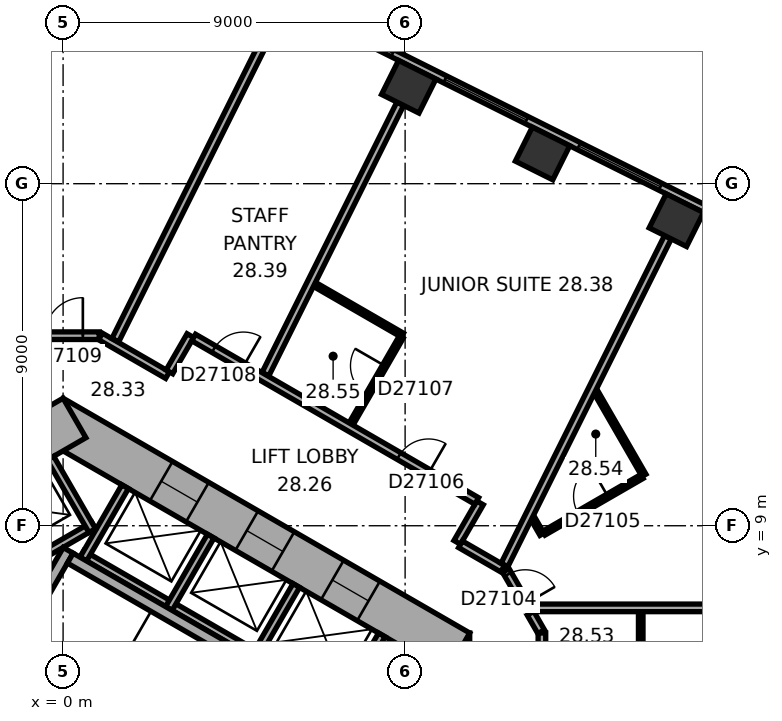
"""IFC4 building model, lengths in metres.
Left out: names, types, materials, properties, quantities, classifications, styles, units other than length and angle.
Written with IfcOpenShell. Run it as: python <this file> out.ifc"""

import sys

from ifc_helpers import new_model, si_unit, direction, frame, frame_2d, origin, origin_2d, place, context, subcontext, project, spatial, rectangle, extrude, element, fill, save


model = new_model("IFC4")
c1 = context("Model", 3, precision=1e-05, world=origin(), true_north=direction((0.0, 1.0)))
c2 = subcontext(c1, "Body", "Model", "MODEL_VIEW")
j1 = project(units=[si_unit("LENGTHUNIT", "METRE"), si_unit("PLANEANGLEUNIT", "RADIAN")], contexts=[c1])
p1 = place(None, origin())
s1 = spatial("IfcSite", under=j1, at=p1, CompositionType="ELEMENT")
p2 = place(p1, origin())
s2 = spatial("IfcBuilding", under=s1, at=p2, CompositionType="ELEMENT")
p3 = place(p2, frame((0.0, 0.0, 116.6)))
s3 = spatial("IfcBuildingStorey", under=s2, at=p3, CompositionType="ELEMENT", Elevation=116.6)
for number, where, z_axis, x_axis in (
    (1, (16.138, 17.04, 0.0), (0.0, 0.0, 1.0), (-0.895, 0.446, 0.0)),
    (2, (12.616, 18.795, 0.0), (0.0, 0.0, 1.0), (-0.895, 0.446, 0.0)),
    (3, (9.095, 20.551, 0.0), (0.0, 0.0, 1.0), (-0.895, 0.446, 0.0)),
):
    element("IfcColumn", number, at=place(p3, frame(where, z_axis=z_axis, x_axis=x_axis)), inside=s3, PredefinedType="COLUMN", context=c2, shape_type="SweptSolid", body=[
        extrude(rectangle(XDim=1.1, YDim=1.0, at=origin_2d()), origin(), (0.0, 0.0, 1.0), 3.3),
    ])
p4 = place(p3, frame((10.1, -6.177, 0.0), z_axis=(0.0, 0.0, 1.0), x_axis=(0.0, 1.0, 0.0)))
e4 = element("IfcWall", 4, at=p4, inside=s3, PredefinedType="SHEAR", context=c2, shape_type="SweptSolid", body=[
    extrude(rectangle(XDim=12.355, YDim=1.2, at=frame_2d((6.177, 0.0))), origin(), (0.0, 0.0, 1.0), 3.3),
])
p5 = place(p4, frame((6.378, 0.0, 0.0)))
e5 = element("IfcOpeningElement", 5, at=p5, cuts=e4, PredefinedType="OPENING", context=c2, shape_type="SweptSolid", body=[
    extrude(rectangle(XDim=1.5, YDim=2.1, at=frame_2d((0.75, 1.05))), frame((0.0, 0.61, 0.0), z_axis=(0.0, -1.0, 0.0), x_axis=(1.0, 0.0, 0.0)), (0.0, 0.0, 1.0), 1.22),
])
p6 = place(p4, frame((1.828, 0.0, 0.0)))
e6 = element("IfcOpeningElement", 6, at=p6, cuts=e4, PredefinedType="OPENING", context=c2, shape_type="SweptSolid", body=[
    extrude(rectangle(XDim=1.1, YDim=2.1, at=frame_2d((0.55, 1.05))), frame((0.0, 0.61, 0.0), z_axis=(0.0, -1.0, 0.0), x_axis=(1.0, 0.0, 0.0)), (0.0, 0.0, 1.0), 1.22),
])
p7 = place(p4, frame((4.427, 0.0, 0.0)))
e7 = element("IfcOpeningElement", 7, at=p7, cuts=e4, PredefinedType="OPENING", context=c2, shape_type="SweptSolid", body=[
    extrude(rectangle(XDim=1.1, YDim=2.1, at=frame_2d((0.55, 1.05))), frame((0.0, 0.61, 0.0), z_axis=(0.0, -1.0, 0.0), x_axis=(1.0, 0.0, 0.0)), (0.0, 0.0, 1.0), 1.22),
])
p8 = place(p3, frame((10.4, 5.658, 0.0), z_axis=(0.0, 0.0, 1.0), x_axis=(-0.866021384402, 0.500006961711, 0.0)))
e8 = element("IfcWall", 8, at=p8, inside=s3, PredefinedType="SHEAR", context=c2, shape_type="SweptSolid", body=[
    extrude(rectangle(XDim=12.355, YDim=1.2, at=frame_2d((6.178, 0.0))), origin(), (0.0, 0.0, 1.0), 3.3),
])
p9 = place(p8, frame((2.728, 0.0, 0.0)))
e9 = element("IfcOpeningElement", 9, at=p9, cuts=e8, PredefinedType="OPENING", context=c2, shape_type="SweptSolid", body=[
    extrude(rectangle(XDim=1.1, YDim=2.1, at=frame_2d((0.55, 1.05))), frame((0.0, 0.61, 0.0), z_axis=(0.0, -1.0, 0.0), x_axis=(1.0, 0.0, 0.0)), (0.0, 0.0, 1.0), 1.22),
])
p10 = place(p8, frame((5.328, 0.0, 0.0)))
e10 = element("IfcOpeningElement", 10, at=p10, cuts=e8, PredefinedType="OPENING", context=c2, shape_type="SweptSolid", body=[
    extrude(rectangle(XDim=1.1, YDim=2.1, at=frame_2d((0.55, 1.05))), frame((0.0, 0.61, 0.0), z_axis=(0.0, -1.0, 0.0), x_axis=(1.0, 0.0, 0.0)), (0.0, 0.0, 1.0), 1.22),
])
p11 = place(p8, frame((7.928, 0.0, 0.0)))
e11 = element("IfcOpeningElement", 11, at=p11, cuts=e8, PredefinedType="OPENING", context=c2, shape_type="SweptSolid", body=[
    extrude(rectangle(XDim=1.1, YDim=2.1, at=frame_2d((0.55, 1.05))), frame((0.0, 0.61, 0.0), z_axis=(0.0, -1.0, 0.0), x_axis=(1.0, 0.0, 0.0)), (0.0, 0.0, 1.0), 1.22),
])
p12 = place(p3, frame((0.3, 11.836, 0.0), z_axis=(0.0, 0.0, 1.0), x_axis=(-0.866021384402, -0.500006961711, 0.0)))
e12 = element("IfcWall", 12, at=p12, inside=s3, PredefinedType="SHEAR", context=c2, shape_type="SweptSolid", body=[
    extrude(rectangle(XDim=12.355, YDim=1.2, at=frame_2d((6.178, 0.0))), origin(), (0.0, 0.0, 1.0), 3.3),
])
p13 = place(p12, frame((6.378, 0.0, 0.0)))
e13 = element("IfcOpeningElement", 13, at=p13, cuts=e12, PredefinedType="OPENING", context=c2, shape_type="SweptSolid", body=[
    extrude(rectangle(XDim=1.5, YDim=2.1, at=frame_2d((0.75, 1.05))), frame((0.0, 0.61, 0.0), z_axis=(0.0, -1.0, 0.0), x_axis=(1.0, 0.0, 0.0)), (0.0, 0.0, 1.0), 1.22),
])
p14 = place(p12, frame((1.828, 0.0, 0.0)))
e14 = element("IfcOpeningElement", 14, at=p14, cuts=e12, PredefinedType="OPENING", context=c2, shape_type="SweptSolid", body=[
    extrude(rectangle(XDim=1.1, YDim=2.1, at=frame_2d((0.55, 1.05))), frame((0.0, 0.61, 0.0), z_axis=(0.0, -1.0, 0.0), x_axis=(1.0, 0.0, 0.0)), (0.0, 0.0, 1.0), 1.22),
])
p15 = place(p3, frame((20.63, 15.47, 0.0), z_axis=(0.0, 0.0, 1.0), x_axis=(-0.894934518609, 0.446197498203, 0.0)))
e15 = element("IfcWall", 15, at=p15, inside=s3, PredefinedType="STANDARD", context=c2, shape_type="SweptSolid", body=[
    extrude(rectangle(XDim=21.246, YDim=0.2, at=frame_2d((10.623, 0.0))), origin(), (0.0, 0.0, 1.0), 3.3),
])
p16 = place(p15, frame((1.553, 0.0, 0.8)))
e16 = element("IfcOpeningElement", 16, at=p16, cuts=e15, PredefinedType="OPENING", context=c2, shape_type="SweptSolid", body=[
    extrude(rectangle(XDim=2.4, YDim=1.7, at=frame_2d((1.2, 0.85))), frame((0.0, 0.11, 0.0), z_axis=(0.0, -1.0, 0.0), x_axis=(1.0, 0.0, 0.0)), (0.0, 0.0, 1.0), 0.22),
])
p17 = place(p15, frame((5.488, 0.0, 0.8)))
e17 = element("IfcOpeningElement", 17, at=p17, cuts=e15, PredefinedType="OPENING", context=c2, shape_type="SweptSolid", body=[
    extrude(rectangle(XDim=2.4, YDim=1.7, at=frame_2d((1.2, 0.85))), frame((0.0, 0.11, 0.0), z_axis=(0.0, -1.0, 0.0), x_axis=(1.0, 0.0, 0.0)), (0.0, 0.0, 1.0), 0.22),
])
p18 = place(p15, frame((9.422, 0.0, 0.8)))
e18 = element("IfcOpeningElement", 18, at=p18, cuts=e15, PredefinedType="OPENING", context=c2, shape_type="SweptSolid", body=[
    extrude(rectangle(XDim=2.4, YDim=1.7, at=frame_2d((1.2, 0.85))), frame((0.0, 0.11, 0.0), z_axis=(0.0, -1.0, 0.0), x_axis=(1.0, 0.0, 0.0)), (0.0, 0.0, 1.0), 0.22),
])
p19 = place(p15, frame((13.357, 0.0, 0.8)))
e19 = element("IfcOpeningElement", 19, at=p19, cuts=e15, PredefinedType="OPENING", context=c2, shape_type="SweptSolid", body=[
    extrude(rectangle(XDim=2.4, YDim=1.7, at=frame_2d((1.2, 0.85))), frame((0.0, 0.11, 0.0), z_axis=(0.0, -1.0, 0.0), x_axis=(1.0, 0.0, 0.0)), (0.0, 0.0, 1.0), 0.22),
])
p20 = place(p15, frame((17.292, 0.0, 0.8)))
e20 = element("IfcOpeningElement", 20, at=p20, cuts=e15, PredefinedType="OPENING", context=c2, shape_type="SweptSolid", body=[
    extrude(rectangle(XDim=2.4, YDim=1.7, at=frame_2d((1.2, 0.85))), frame((0.0, 0.11, 0.0), z_axis=(0.0, -1.0, 0.0), x_axis=(1.0, 0.0, 0.0)), (0.0, 0.0, 1.0), 0.22),
])
p21 = place(p3, frame((7.424, 4.259, 0.0), z_axis=(0.0, 0.0, 1.0), x_axis=(-0.866026010844, 0.49999894854, 0.0)))
e21 = element("IfcWall", 21, at=p21, inside=s3, PredefinedType="PARTITIONING", context=c2, shape_type="SweptSolid", body=[
    extrude(rectangle(XDim=8.0, YDim=0.2, at=frame_2d((4.0, 0.0))), origin(), (0.0, 0.0, 1.0), 2.95),
])
for number, where, z_axis, x_axis in (
    (22, (7.287, 4.222, 0.0), (0.0, 0.0, 1.0), (0.5, 0.866, 0.0)),
    (23, (5.036, 5.522, 0.0), (0.0, 0.0, 1.0), (0.5, 0.866, 0.0)),
    (24, (2.784, 6.822, 0.0), (0.0, 0.0, 1.0), (0.5, 0.866, 0.0)),
    (25, (0.532, 8.122, 0.0), (0.0, 0.0, 1.0), (0.5, 0.866, 0.0)),
):
    element("IfcWall", number, at=place(p3, frame(where, z_axis=z_axis, x_axis=x_axis)), inside=s3, PredefinedType="PARTITIONING", context=c2, shape_type="SweptSolid", body=[
        extrude(rectangle(XDim=2.2, YDim=0.2, at=frame_2d((1.1, 0.0))), origin(), (0.0, 0.0, 1.0), 2.95),
    ])
p22 = place(p3, frame((0.803, 9.009, 0.0), z_axis=(0.0, 0.0, 1.0), x_axis=(-0.866028230842, -0.499995103361, 0.0)))
e26 = element("IfcWall", 26, at=p22, inside=s3, PredefinedType="PARTITIONING", context=c2, shape_type="SweptSolid", body=[
    extrude(rectangle(XDim=5.4, YDim=0.2, at=frame_2d((2.7, 0.0))), origin(), (0.0, 0.0, 1.0), 2.95),
])
p23 = place(p3, frame((0.767, 8.872, 0.0), z_axis=(0.0, 0.0, 1.0), x_axis=(-0.499994660107, 0.866028486751, 0.0)))
e27 = element("IfcWall", 27, at=p23, inside=s3, PredefinedType="PARTITIONING", context=c2, shape_type="SweptSolid", body=[
    extrude(rectangle(XDim=2.2, YDim=0.2, at=frame_2d((1.1, 0.0))), origin(), (0.0, 0.0, 1.0), 2.95),
])
p24 = place(p3, frame((-2.216, 4.282, 0.0), z_axis=(0.0, 0.0, 1.0), x_axis=(0.499977259774, 0.866038532462, 0.0)))
e28 = element("IfcWall", 28, at=p24, inside=s3, PredefinedType="SHEAR", context=c2, shape_type="SweptSolid", body=[
    extrude(rectangle(XDim=4.7, YDim=0.3, at=frame_2d((2.35, 0.0))), origin(), (0.0, 0.0, 1.0), 2.95),
])
p25 = place(p3, frame((6.303, 4.617, 0.0), z_axis=(0.0, 0.0, 1.0), x_axis=(-0.866027801685, 0.499995846692, 0.0)))
e29 = element("IfcWall", 29, at=p25, inside=s3, PredefinedType="SHEAR", context=c2, shape_type="SweptSolid", body=[
    extrude(rectangle(XDim=7.06, YDim=0.3, at=frame_2d((3.53, 0.0))), origin(), (0.0, 0.0, 1.0), 2.95),
])
p26 = place(p3, frame((0.95, 14.001, 0.0), z_axis=(0.0, 0.0, 1.0), x_axis=(-1.0, 0.0, 0.0)))
e30 = element("IfcWall", 30, at=p26, inside=s3, PredefinedType="PARTITIONING", context=c2, shape_type="SweptSolid", body=[
    extrude(rectangle(XDim=1.86, YDim=0.2, at=frame_2d((0.93, 0.0))), origin(), (0.0, 0.0, 1.0), 2.95),
])
p27 = place(p26, frame((0.43, 0.0, 0.0)))
e31 = element("IfcOpeningElement", 31, at=p27, cuts=e30, PredefinedType="OPENING", context=c2, shape_type="SweptSolid", body=[
    extrude(rectangle(XDim=1.0, YDim=2.1, at=frame_2d((0.5, 1.05))), frame((0.0, 0.11, 0.0), z_axis=(0.0, -1.0, 0.0), x_axis=(1.0, 0.0, 0.0)), (0.0, 0.0, 1.0), 0.22),
])
p28 = place(p3, frame((2.748, 12.962, 0.0), z_axis=(0.0, 0.0, 1.0), x_axis=(-0.866013897511, 0.50001992892, 0.0)))
e32 = element("IfcWall", 32, at=p28, inside=s3, PredefinedType="PARTITIONING", context=c2, shape_type="SweptSolid", body=[
    extrude(rectangle(XDim=2.037, YDim=0.2, at=frame_2d((1.018, 0.0))), origin(), (0.0, 0.0, 1.0), 2.95),
])
p29 = place(p3, frame((3.349, 14.002, 0.0), z_axis=(0.0, 0.0, 1.0), x_axis=(-0.500074377092, -0.865982457891, 0.0)))
e33 = element("IfcWall", 33, at=p29, inside=s3, PredefinedType="PARTITIONING", context=c2, shape_type="SweptSolid", body=[
    extrude(rectangle(XDim=1.101, YDim=0.2, at=frame_2d((0.55, 0.0))), origin(), (0.0, 0.0, 1.0), 2.95),
])
p30 = place(p3, frame((5.351, 21.859, 0.0), z_axis=(0.0, 0.0, 1.0), x_axis=(-0.446205309328, -0.894930624086, 0.0)))
e34 = element("IfcWall", 34, at=p30, inside=s3, PredefinedType="PARTITIONING", context=c2, shape_type="SweptSolid", body=[
    extrude(rectangle(XDim=8.913, YDim=0.2, at=frame_2d((4.457, 0.0))), origin(), (0.0, 0.0, 1.0), 2.15),
])
p31 = place(p3, frame((6.614, 15.351, 0.0), z_axis=(0.0, 0.0, 1.0), x_axis=(0.866024262117, -0.500001977421, 0.0)))
e35 = element("IfcWall", 35, at=p31, inside=s3, PredefinedType="PARTITIONING", context=c2, shape_type="SweptSolid", body=[
    extrude(rectangle(XDim=2.671, YDim=0.12, at=frame_2d((1.336, 0.0))), origin(), (0.0, 0.0, 1.0), 2.95),
])
p32 = place(p3, frame((8.872, 20.104, 0.0), z_axis=(0.0, 0.0, 1.0), x_axis=(-0.446218378653, -0.894924107706, 0.0)))
e36 = element("IfcWall", 36, at=p32, inside=s3, PredefinedType="PARTITIONING", context=c2, shape_type="SweptSolid", body=[
    extrude(rectangle(XDim=7.95, YDim=0.2, at=frame_2d((3.975, 0.0))), origin(), (0.0, 0.0, 1.0), 2.95),
])
p33 = place(p3, frame((8.897, 13.963, 0.0), z_axis=(0.0, 0.0, 1.0), x_axis=(-0.500048002682, -0.865997687649, 0.0)))
e37 = element("IfcWall", 37, at=p33, inside=s3, PredefinedType="PARTITIONING", context=c2, shape_type="SweptSolid", body=[
    extrude(rectangle(XDim=2.64, YDim=0.12, at=frame_2d((1.32, 0.0))), origin(), (0.0, 0.0, 1.0), 2.15),
])
p34 = place(p33, frame((0.87, 0.0, 0.0)))
e38 = element("IfcOpeningElement", 38, at=p34, cuts=e37, PredefinedType="OPENING", context=c2, shape_type="SweptSolid", body=[
    extrude(rectangle(XDim=0.9, YDim=2.1, at=frame_2d((0.45, 1.05))), frame((0.0, 0.07, 0.0), z_axis=(0.0, -1.0, 0.0), x_axis=(1.0, 0.0, 0.0)), (0.0, 0.0, 1.0), 0.14),
])
p35 = place(p3, frame((10.371, 8.561, 0.0), z_axis=(0.0, 0.0, 1.0), x_axis=(0.499986357472, 0.866033280158, 0.0)))
e39 = element("IfcWall", 39, at=p35, inside=s3, PredefinedType="PARTITIONING", context=c2, shape_type="SweptSolid", body=[
    extrude(rectangle(XDim=1.201, YDim=0.2, at=frame_2d((0.601, 0.0))), origin(), (0.0, 0.0, 1.0), 2.95),
])
p36 = place(p3, frame((10.885, 9.652, 0.0), z_axis=(0.0, 0.0, 1.0), x_axis=(-0.866033868542, 0.499985338323, 0.0)))
e40 = element("IfcWall", 40, at=p36, inside=s3, PredefinedType="PARTITIONING", context=c2, shape_type="SweptSolid", body=[
    extrude(rectangle(XDim=8.602, YDim=0.2, at=frame_2d((4.301, 0.0))), origin(), (0.0, 0.0, 1.0), 2.95),
])
p37 = place(p36, frame((1.464, 0.0, 0.0)))
e41 = element("IfcOpeningElement", 41, at=p37, cuts=e40, PredefinedType="OPENING", context=c2, shape_type="SweptSolid", body=[
    extrude(rectangle(XDim=0.9, YDim=2.1, at=frame_2d((0.45, 1.05))), frame((0.0, 0.11, 0.0), z_axis=(0.0, -1.0, 0.0), x_axis=(1.0, 0.0, 0.0)), (0.0, 0.0, 1.0), 0.22),
])
p38 = place(p36, frame((7.09, 0.0, 0.0)))
e42 = element("IfcOpeningElement", 42, at=p38, cuts=e40, PredefinedType="OPENING", context=c2, shape_type="SweptSolid", body=[
    extrude(rectangle(XDim=0.9, YDim=2.1, at=frame_2d((0.45, 1.05))), frame((0.0, 0.11, 0.0), z_axis=(0.0, -1.0, 0.0), x_axis=(1.0, 0.0, 0.0)), (0.0, 0.0, 1.0), 0.22),
])
p39 = place(p3, frame((11.566, 7.871, 0.0), z_axis=(0.0, 0.0, 1.0), x_axis=(-0.866004557827, 0.500036104519, 0.0)))
e43 = element("IfcWall", 43, at=p39, inside=s3, PredefinedType="PARTITIONING", context=c2, shape_type="SweptSolid", body=[
    extrude(rectangle(XDim=1.28, YDim=0.2, at=frame_2d((0.64, 0.0))), origin(), (0.0, 0.0, 1.0), 2.95),
])
p40 = place(p3, frame((12.218, 6.839, 0.0), z_axis=(0.0, 0.0, 1.0), x_axis=(-0.500044870432, 0.865999496279, 0.0)))
e44 = element("IfcWall", 44, at=p40, inside=s3, PredefinedType="PARTITIONING", context=c2, shape_type="SweptSolid", body=[
    extrude(rectangle(XDim=1.136, YDim=0.2, at=frame_2d((0.568, 0.0))), origin(), (0.0, 0.0, 1.0), 2.95),
])
p41 = place(p40, frame((0.118, 0.0, 0.0)))
e45 = element("IfcOpeningElement", 45, at=p41, cuts=e44, PredefinedType="OPENING", context=c2, shape_type="SweptSolid", body=[
    extrude(rectangle(XDim=0.9, YDim=2.1, at=frame_2d((0.45, 1.05))), frame((0.0, 0.11, 0.0), z_axis=(0.0, -1.0, 0.0), x_axis=(1.0, 0.0, 0.0)), (0.0, 0.0, 1.0), 0.22),
])
p42 = place(p3, frame((12.58, 6.212, 0.0), z_axis=(0.0, 0.0, 1.0), x_axis=(-0.499936258447, 0.86606220186, 0.0)))
e46 = element("IfcWall", 46, at=p42, inside=s3, PredefinedType="PARTITIONING", context=c2, shape_type="SweptSolid", body=[
    extrude(rectangle(XDim=0.56, YDim=0.2, at=frame_2d((0.28, 0.0))), origin(), (0.0, 0.0, 1.0), 2.95),
])
p43 = place(p3, frame((12.6, 3.004, 0.0), z_axis=(0.0, 0.0, 1.0), x_axis=(0.0, 1.0, 0.0)))
e47 = element("IfcWall", 47, at=p43, inside=s3, PredefinedType="PARTITIONING", context=c2, shape_type="SweptSolid", body=[
    extrude(rectangle(XDim=3.173, YDim=0.2, at=frame_2d((1.586, 0.0))), origin(), (0.0, 0.0, 1.0), 2.95),
])
p44 = place(p43, frame((0.225, 0.0, 0.0)))
e48 = element("IfcOpeningElement", 48, at=p44, cuts=e47, PredefinedType="OPENING", context=c2, shape_type="SweptSolid", body=[
    extrude(rectangle(XDim=0.9, YDim=2.1, at=frame_2d((0.45, 1.05))), frame((0.0, 0.11, 0.0), z_axis=(0.0, -1.0, 0.0), x_axis=(1.0, 0.0, 0.0)), (0.0, 0.0, 1.0), 0.22),
])
p45 = place(p3, frame((12.601, 8.776, 0.0), z_axis=(0.0, 0.0, 1.0), x_axis=(-0.500166486798, 0.865929261247, 0.0)))
e49 = element("IfcWall", 49, at=p45, inside=s3, PredefinedType="PARTITIONING", context=c2, shape_type="SweptSolid", body=[
    extrude(rectangle(XDim=0.476, YDim=0.12, at=frame_2d((0.238, 0.0))), origin(), (0.0, 0.0, 1.0), 2.95),
])
p46 = place(p3, frame((14.022, 12.515, 0.0), z_axis=(0.0, 0.0, 1.0), x_axis=(0.499962146402, -0.866047257466, 0.0)))
e50 = element("IfcWall", 50, at=p46, inside=s3, PredefinedType="PARTITIONING", context=c2, shape_type="SweptSolid", body=[
    extrude(rectangle(XDim=2.528, YDim=0.12, at=frame_2d((1.264, 0.0))), origin(), (0.0, 0.0, 1.0), 2.95),
])
p47 = place(p3, frame((15.2, 6.739, 0.0), z_axis=(0.0, 0.0, 1.0), x_axis=(0.0, -1.0, 0.0)))
e51 = element("IfcWall", 51, at=p47, inside=s3, PredefinedType="PARTITIONING", context=c2, shape_type="SweptSolid", body=[
    extrude(rectangle(XDim=2.274, YDim=0.12, at=frame_2d((1.137, 0.0))), origin(), (0.0, 0.0, 1.0), 2.95),
])
p48 = place(p3, frame((15.233, 10.296, 0.0), z_axis=(0.0, 0.0, 1.0), x_axis=(-0.866010940986, -0.500025049464, 0.0)))
e52 = element("IfcWall", 52, at=p48, inside=s3, PredefinedType="PARTITIONING", context=c2, shape_type="SweptSolid", body=[
    extrude(rectangle(XDim=2.98, YDim=0.12, at=frame_2d((1.49, 0.0))), origin(), (0.0, 0.0, 1.0), 2.95),
])
p49 = place(p48, frame((1.04, 0.0, 0.0)))
e53 = element("IfcOpeningElement", 53, at=p49, cuts=e52, PredefinedType="OPENING", context=c2, shape_type="SweptSolid", body=[
    extrude(rectangle(XDim=0.9, YDim=2.1, at=frame_2d((0.45, 1.05))), frame((0.0, 0.07, 0.0), z_axis=(0.0, -1.0, 0.0), x_axis=(1.0, 0.0, 0.0)), (0.0, 0.0, 1.0), 0.14),
])
p50 = place(p3, frame((15.915, 16.592, 0.0), z_axis=(0.0, 0.0, 1.0), x_axis=(-0.446199736347, -0.894933402709, 0.0)))
e54 = element("IfcWall", 54, at=p50, inside=s3, PredefinedType="PARTITIONING", context=c2, shape_type="SweptSolid", body=[
    extrude(rectangle(XDim=9.635, YDim=0.2, at=frame_2d((4.817, 0.0))), origin(), (0.0, 0.0, 1.0), 2.95),
])
p51 = place(p3, frame((21.95, 6.839, 0.0), z_axis=(0.0, 0.0, 1.0), x_axis=(-1.0, 0.0, 0.0)))
e55 = element("IfcWall", 55, at=p51, inside=s3, PredefinedType="PARTITIONING", context=c2, shape_type="SweptSolid", body=[
    extrude(rectangle(XDim=9.65, YDim=0.2, at=frame_2d((4.825, 0.0))), origin(), (0.0, 0.0, 1.0), 2.95),
])
p52 = place(p17, origin())
e56 = element("IfcWindow", 56, at=p52, inside=s3, PartitioningType="SINGLE_PANEL", PredefinedType="WINDOW", context=c2, shape_type="SweptSolid", body=[
    extrude(rectangle(XDim=2.4, YDim=1.7, at=frame_2d((1.2, 0.85))), frame((0.0, 0.03, 0.0), z_axis=(0.0, -1.0, 0.0), x_axis=(1.0, 0.0, 0.0)), (0.0, 0.0, 1.0), 0.06),
])
fill(e17, e56)
p53 = place(p18, origin())
e57 = element("IfcWindow", 57, at=p53, inside=s3, PartitioningType="SINGLE_PANEL", PredefinedType="WINDOW", context=c2, shape_type="SweptSolid", body=[
    extrude(rectangle(XDim=2.4, YDim=1.7, at=frame_2d((1.2, 0.85))), frame((0.0, 0.03, 0.0), z_axis=(0.0, -1.0, 0.0), x_axis=(1.0, 0.0, 0.0)), (0.0, 0.0, 1.0), 0.06),
])
fill(e18, e57)
p54 = place(p19, origin())
e58 = element("IfcWindow", 58, at=p54, inside=s3, PartitioningType="SINGLE_PANEL", PredefinedType="WINDOW", context=c2, shape_type="SweptSolid", body=[
    extrude(rectangle(XDim=2.4, YDim=1.7, at=frame_2d((1.2, 0.85))), frame((0.0, 0.03, 0.0), z_axis=(0.0, -1.0, 0.0), x_axis=(1.0, 0.0, 0.0)), (0.0, 0.0, 1.0), 0.06),
])
fill(e19, e58)
p55 = place(p9, origin())
e59 = element("IfcDoor", 59, at=p55, inside=s3, OperationType="DOUBLE_DOOR_SLIDING", PredefinedType="DOOR", context=c2, shape_type="SweptSolid", body=[
    extrude(rectangle(XDim=1.1, YDim=2.1, at=frame_2d((0.55, 1.05))), frame((0.0, 0.025, 0.0), z_axis=(0.0, -1.0, 0.0), x_axis=(1.0, 0.0, 0.0)), (0.0, 0.0, 1.0), 0.05),
])
fill(e9, e59)
p56 = place(p10, origin())
e60 = element("IfcDoor", 60, at=p56, inside=s3, OperationType="DOUBLE_DOOR_SLIDING", PredefinedType="DOOR", context=c2, shape_type="SweptSolid", body=[
    extrude(rectangle(XDim=1.1, YDim=2.1, at=frame_2d((0.55, 1.05))), frame((0.0, 0.025, 0.0), z_axis=(0.0, -1.0, 0.0), x_axis=(1.0, 0.0, 0.0)), (0.0, 0.0, 1.0), 0.05),
])
fill(e10, e60)
p57 = place(p11, origin())
e61 = element("IfcDoor", 61, at=p57, inside=s3, OperationType="DOUBLE_DOOR_SLIDING", PredefinedType="DOOR", context=c2, shape_type="SweptSolid", body=[
    extrude(rectangle(XDim=1.1, YDim=2.1, at=frame_2d((0.55, 1.05))), frame((0.0, 0.025, 0.0), z_axis=(0.0, -1.0, 0.0), x_axis=(1.0, 0.0, 0.0)), (0.0, 0.0, 1.0), 0.05),
])
fill(e11, e61)
p58 = place(p41, origin())
e62 = element("IfcDoor", 62, at=p58, inside=s3, OperationType="SINGLE_SWING_LEFT", PredefinedType="DOOR", context=c2, shape_type="SweptSolid", body=[
    extrude(rectangle(XDim=0.9, YDim=2.1, at=frame_2d((0.45, 1.05))), frame((0.0, 0.025, 0.0), z_axis=(0.0, -1.0, 0.0), x_axis=(1.0, 0.0, 0.0)), (0.0, 0.0, 1.0), 0.05),
])
fill(e45, e62)
p59 = place(p49, origin())
e63 = element("IfcDoor", 63, at=p59, inside=s3, OperationType="SINGLE_SWING_LEFT", PredefinedType="DOOR", context=c2, shape_type="SweptSolid", body=[
    extrude(rectangle(XDim=0.9, YDim=2.1, at=frame_2d((0.45, 1.05))), frame((0.0, 0.025, 0.0), z_axis=(0.0, -1.0, 0.0), x_axis=(1.0, 0.0, 0.0)), (0.0, 0.0, 1.0), 0.05),
])
fill(e53, e63)
p60 = place(p37, origin())
e64 = element("IfcDoor", 64, at=p60, inside=s3, OperationType="SINGLE_SWING_LEFT", PredefinedType="DOOR", context=c2, shape_type="SweptSolid", body=[
    extrude(rectangle(XDim=0.9, YDim=2.1, at=frame_2d((0.45, 1.05))), frame((0.0, 0.025, 0.0), z_axis=(0.0, -1.0, 0.0), x_axis=(1.0, 0.0, 0.0)), (0.0, 0.0, 1.0), 0.05),
])
fill(e41, e64)
p61 = place(p34, origin())
e65 = element("IfcDoor", 65, at=p61, inside=s3, OperationType="SINGLE_SWING_LEFT", PredefinedType="DOOR", context=c2, shape_type="SweptSolid", body=[
    extrude(rectangle(XDim=0.9, YDim=2.1, at=frame_2d((0.45, 1.05))), frame((0.0, 0.025, 0.0), z_axis=(0.0, -1.0, 0.0), x_axis=(1.0, 0.0, 0.0)), (0.0, 0.0, 1.0), 0.05),
])
fill(e38, e65)
p62 = place(p38, origin())
e66 = element("IfcDoor", 66, at=p62, inside=s3, OperationType="SINGLE_SWING_LEFT", PredefinedType="DOOR", context=c2, shape_type="SweptSolid", body=[
    extrude(rectangle(XDim=0.9, YDim=2.1, at=frame_2d((0.45, 1.05))), frame((0.0, 0.025, 0.0), z_axis=(0.0, -1.0, 0.0), x_axis=(1.0, 0.0, 0.0)), (0.0, 0.0, 1.0), 0.05),
])
fill(e42, e66)
p63 = place(p27, origin())
e67 = element("IfcDoor", 67, at=p63, inside=s3, OperationType="SINGLE_SWING_LEFT", PredefinedType="DOOR", context=c2, shape_type="SweptSolid", body=[
    extrude(rectangle(XDim=1.0, YDim=2.1, at=frame_2d((0.5, 1.05))), frame((0.0, 0.025, 0.0), z_axis=(0.0, -1.0, 0.0), x_axis=(1.0, 0.0, 0.0)), (0.0, 0.0, 1.0), 0.05),
])
fill(e31, e67)
save(model, sys.argv[1])
